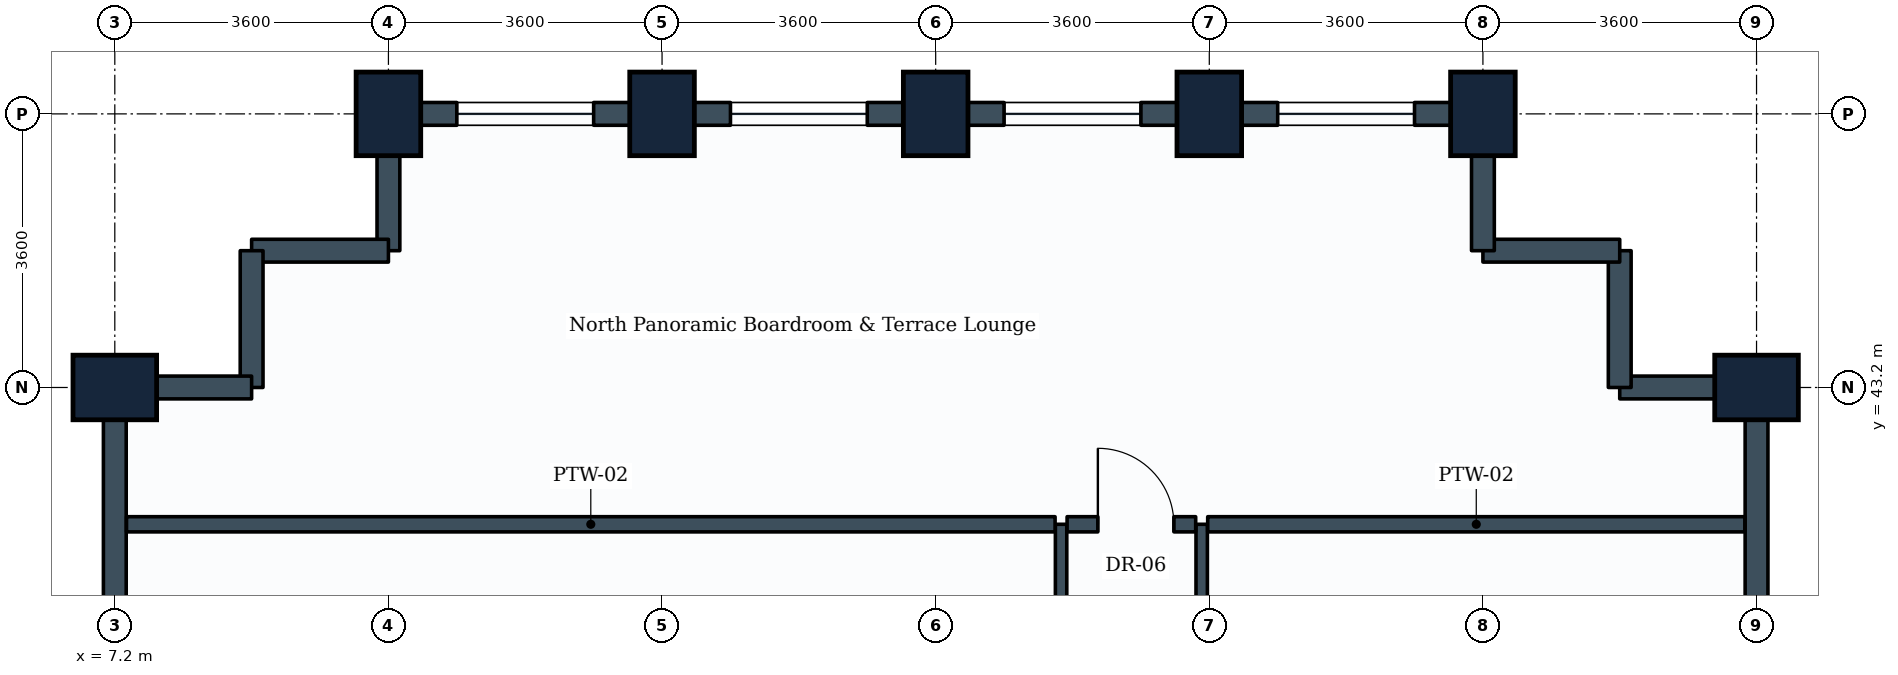
"""IFC4 building model, lengths in metres.
Left out: names, types, materials, properties, quantities, classifications, styles, units other than length and angle.
Written with IfcOpenShell. Run it as: python <this file> out.ifc"""

import sys

from ifc_helpers import new_model, si_unit, direction, frame, frame_2d, origin, origin_2d, place, context, subcontext, project, spatial, rectangle, extrude, element, fill, save


model = new_model("IFC4")
c1 = context("Model", 3, precision=1e-05, world=origin(), true_north=direction((0.0, 1.0)))
c2 = subcontext(c1, "Body", "Model", "MODEL_VIEW")
j1 = project(units=[si_unit("LENGTHUNIT", "METRE"), si_unit("PLANEANGLEUNIT", "RADIAN")], contexts=[c1])
p1 = place(None, origin())
s1 = spatial("IfcSite", under=j1, at=p1, CompositionType="ELEMENT")
p2 = place(p1, origin())
s2 = spatial("IfcBuilding", under=s1, at=p2, CompositionType="ELEMENT")
p3 = place(p2, frame((0.0, 0.0, 103.5)))
s3 = spatial("IfcBuildingStorey", under=s2, at=p3, CompositionType="ELEMENT", Elevation=103.5)
for number, where, z_axis, x_axis in (
    (1, (7.2, 43.2, 0.0), (0.0, 0.0, 1.0), (0.0, 1.0, 0.0)),
    (2, (10.8, 46.8, 0.0), (0.0, 0.0, 1.0), (1.0, 0.0, 0.0)),
    (3, (14.4, 46.8, 0.0), (0.0, 0.0, 1.0), (1.0, 0.0, 0.0)),
    (4, (18.0, 46.8, 0.0), (0.0, 0.0, 1.0), (1.0, 0.0, 0.0)),
    (5, (21.6, 46.8, 0.0), (0.0, 0.0, 1.0), (1.0, 0.0, 0.0)),
    (6, (25.2, 46.8, 0.0), (0.0, 0.0, 1.0), (1.0, 0.0, 0.0)),
    (7, (28.8, 43.2, 0.0), (0.0, 0.0, 1.0), (0.0, 1.0, 0.0)),
):
    element("IfcColumn", number, at=place(p3, frame(where, z_axis=z_axis, x_axis=x_axis)), inside=s3, PredefinedType="COLUMN", context=c2, shape_type="SweptSolid", body=[
        extrude(rectangle(XDim=0.85, YDim=1.1, at=origin_2d()), origin(), (0.0, 0.0, 1.0), 3.9),
    ])
p4 = place(p3, frame((28.8, 43.2, 0.0), z_axis=(0.0, 0.0, 1.0), x_axis=(0.0, -1.0, 0.0)))
e8 = element("IfcWall", 8, at=p4, inside=s3, PredefinedType="STANDARD", context=c2, shape_type="SweptSolid", body=[
    extrude(rectangle(XDim=3.6, YDim=0.3, at=frame_2d((1.8, 0.0))), origin(), (0.0, 0.0, 1.0), 2.93),
])
p5 = place(p3, frame((27.0, 43.2, 0.0), z_axis=(0.0, 0.0, 1.0), x_axis=(1.0, 0.0, 0.0)))
e9 = element("IfcWall", 9, at=p5, inside=s3, PredefinedType="STANDARD", context=c2, shape_type="SweptSolid", body=[
    extrude(rectangle(XDim=1.8, YDim=0.3, at=frame_2d((0.9, 0.0))), origin(), (0.0, 0.0, 1.0), 2.93),
])
for number, where, z_axis, x_axis in (
    (10, (27.0, 43.2, 0.0), (0.0, 0.0, 1.0), (0.0, 1.0, 0.0)),
    (11, (25.2, 45.0, 0.0), (0.0, 0.0, 1.0), (1.0, 0.0, 0.0)),
):
    element("IfcWall", number, at=place(p3, frame(where, z_axis=z_axis, x_axis=x_axis)), inside=s3, PredefinedType="STANDARD", context=c2, shape_type="SweptSolid", body=[
        extrude(rectangle(XDim=1.8, YDim=0.3, at=frame_2d((0.9, 0.0))), origin(), (0.0, 0.0, 1.0), 3.635),
    ])
p6 = place(p3, frame((25.2, 45.0, 0.0), z_axis=(0.0, 0.0, 1.0), x_axis=(0.0, 1.0, 0.0)))
e12 = element("IfcWall", 12, at=p6, inside=s3, PredefinedType="STANDARD", context=c2, shape_type="SweptSolid", body=[
    extrude(rectangle(XDim=1.8, YDim=0.3, at=frame_2d((0.9, 0.0))), origin(), (0.0, 0.0, 1.0), 2.93),
])
p7 = place(p3, frame((21.6, 46.8, 0.0), z_axis=(0.0, 0.0, 1.0), x_axis=(1.0, 0.0, 0.0)))
e13 = element("IfcWall", 13, at=p7, inside=s3, PredefinedType="STANDARD", context=c2, shape_type="SweptSolid", body=[
    extrude(rectangle(XDim=3.6, YDim=0.3, at=frame_2d((1.8, 0.0))), origin(), (0.0, 0.0, 1.0), 2.93),
])
p8 = place(p7, frame((0.9, 0.0, 0.85)))
e14 = element("IfcOpeningElement", 14, at=p8, cuts=e13, PredefinedType="OPENING", context=c2, shape_type="SweptSolid", body=[
    extrude(rectangle(XDim=1.8, YDim=1.35, at=frame_2d((0.9, 0.675))), frame((0.0, 0.16, 0.0), z_axis=(0.0, -1.0, 0.0), x_axis=(1.0, 0.0, 0.0)), (0.0, 0.0, 1.0), 0.32),
])
p9 = place(p3, frame((18.0, 46.8, 0.0), z_axis=(0.0, 0.0, 1.0), x_axis=(1.0, 0.0, 0.0)))
e15 = element("IfcWall", 15, at=p9, inside=s3, PredefinedType="STANDARD", context=c2, shape_type="SweptSolid", body=[
    extrude(rectangle(XDim=3.6, YDim=0.3, at=frame_2d((1.8, 0.0))), origin(), (0.0, 0.0, 1.0), 2.93),
])
p10 = place(p9, frame((0.9, 0.0, 0.85)))
e16 = element("IfcOpeningElement", 16, at=p10, cuts=e15, PredefinedType="OPENING", context=c2, shape_type="SweptSolid", body=[
    extrude(rectangle(XDim=1.8, YDim=1.35, at=frame_2d((0.9, 0.675))), frame((0.0, 0.16, 0.0), z_axis=(0.0, -1.0, 0.0), x_axis=(1.0, 0.0, 0.0)), (0.0, 0.0, 1.0), 0.32),
])
p11 = place(p3, frame((14.4, 46.8, 0.0), z_axis=(0.0, 0.0, 1.0), x_axis=(1.0, 0.0, 0.0)))
e17 = element("IfcWall", 17, at=p11, inside=s3, PredefinedType="STANDARD", context=c2, shape_type="SweptSolid", body=[
    extrude(rectangle(XDim=3.6, YDim=0.3, at=frame_2d((1.8, 0.0))), origin(), (0.0, 0.0, 1.0), 2.93),
])
p12 = place(p11, frame((0.9, 0.0, 0.85)))
e18 = element("IfcOpeningElement", 18, at=p12, cuts=e17, PredefinedType="OPENING", context=c2, shape_type="SweptSolid", body=[
    extrude(rectangle(XDim=1.8, YDim=1.35, at=frame_2d((0.9, 0.675))), frame((0.0, 0.16, 0.0), z_axis=(0.0, -1.0, 0.0), x_axis=(1.0, 0.0, 0.0)), (0.0, 0.0, 1.0), 0.32),
])
p13 = place(p3, frame((10.8, 46.8, 0.0), z_axis=(0.0, 0.0, 1.0), x_axis=(1.0, 0.0, 0.0)))
e19 = element("IfcWall", 19, at=p13, inside=s3, PredefinedType="STANDARD", context=c2, shape_type="SweptSolid", body=[
    extrude(rectangle(XDim=3.6, YDim=0.3, at=frame_2d((1.8, 0.0))), origin(), (0.0, 0.0, 1.0), 2.93),
])
p14 = place(p13, frame((0.9, 0.0, 0.85)))
e20 = element("IfcOpeningElement", 20, at=p14, cuts=e19, PredefinedType="OPENING", context=c2, shape_type="SweptSolid", body=[
    extrude(rectangle(XDim=1.8, YDim=1.35, at=frame_2d((0.9, 0.675))), frame((0.0, 0.16, 0.0), z_axis=(0.0, -1.0, 0.0), x_axis=(1.0, 0.0, 0.0)), (0.0, 0.0, 1.0), 0.32),
])
p15 = place(p3, frame((10.8, 45.0, 0.0), z_axis=(0.0, 0.0, 1.0), x_axis=(0.0, 1.0, 0.0)))
e21 = element("IfcWall", 21, at=p15, inside=s3, PredefinedType="STANDARD", context=c2, shape_type="SweptSolid", body=[
    extrude(rectangle(XDim=1.8, YDim=0.3, at=frame_2d((0.9, 0.0))), origin(), (0.0, 0.0, 1.0), 2.93),
])
for number, where, z_axis, x_axis in (
    (22, (9.0, 45.0, 0.0), (0.0, 0.0, 1.0), (1.0, 0.0, 0.0)),
    (23, (9.0, 43.2, 0.0), (0.0, 0.0, 1.0), (0.0, 1.0, 0.0)),
):
    element("IfcWall", number, at=place(p3, frame(where, z_axis=z_axis, x_axis=x_axis)), inside=s3, PredefinedType="STANDARD", context=c2, shape_type="SweptSolid", body=[
        extrude(rectangle(XDim=1.8, YDim=0.3, at=frame_2d((0.9, 0.0))), origin(), (0.0, 0.0, 1.0), 3.635),
    ])
p16 = place(p3, frame((7.2, 43.2, 0.0), z_axis=(0.0, 0.0, 1.0), x_axis=(1.0, 0.0, 0.0)))
e24 = element("IfcWall", 24, at=p16, inside=s3, PredefinedType="STANDARD", context=c2, shape_type="SweptSolid", body=[
    extrude(rectangle(XDim=1.8, YDim=0.3, at=frame_2d((0.9, 0.0))), origin(), (0.0, 0.0, 1.0), 2.93),
])
p17 = place(p3, frame((7.2, 39.6, 0.0), z_axis=(0.0, 0.0, 1.0), x_axis=(0.0, 1.0, 0.0)))
e25 = element("IfcWall", 25, at=p17, inside=s3, PredefinedType="STANDARD", context=c2, shape_type="SweptSolid", body=[
    extrude(rectangle(XDim=3.6, YDim=0.3, at=frame_2d((1.8, 0.0))), origin(), (0.0, 0.0, 1.0), 2.93),
])
p18 = place(p3, frame((19.65, 34.469, 0.0), z_axis=(0.0, 0.0, 1.0), x_axis=(0.0, 1.0, 0.0)))
e26 = element("IfcWall", 26, at=p18, inside=s3, PredefinedType="PARTITIONING", context=c2, shape_type="SweptSolid", body=[
    extrude(rectangle(XDim=6.931, YDim=0.15, at=frame_2d((3.465, 0.0))), origin(), (0.0, 0.0, 1.0), 3.19),
])
p19 = place(p18, frame((1.386, 0.0, 0.0)))
e27 = element("IfcOpeningElement", 27, at=p19, cuts=e26, PredefinedType="OPENING", context=c2, shape_type="SweptSolid", body=[
    extrude(rectangle(XDim=1.0, YDim=2.1, at=frame_2d((0.5, 1.05))), frame((0.0, 0.085, 0.0), z_axis=(0.0, -1.0, 0.0), x_axis=(1.0, 0.0, 0.0)), (0.0, 0.0, 1.0), 0.17),
])
p20 = place(p3, frame((21.5, 34.329, 0.0), z_axis=(0.0, 0.0, 1.0), x_axis=(0.0, 1.0, 0.0)))
e28 = element("IfcWall", 28, at=p20, inside=s3, PredefinedType="PARTITIONING", context=c2, shape_type="SweptSolid", body=[
    extrude(rectangle(XDim=7.071, YDim=0.15, at=frame_2d((3.535, 0.0))), origin(), (0.0, 0.0, 1.0), 3.18),
])
p21 = place(p20, frame((2.996, 0.0, 0.0)))
e29 = element("IfcOpeningElement", 29, at=p21, cuts=e28, PredefinedType="OPENING", context=c2, shape_type="SweptSolid", body=[
    extrude(rectangle(XDim=1.0, YDim=2.1, at=frame_2d((0.5, 1.05))), frame((0.0, 0.085, 0.0), z_axis=(0.0, -1.0, 0.0), x_axis=(1.0, 0.0, 0.0)), (0.0, 0.0, 1.0), 0.17),
])
p22 = place(p3, frame((7.354, 41.4, 0.0), z_axis=(0.0, 0.0, 1.0), x_axis=(1.0, 0.0, 0.0)))
e30 = element("IfcWall", 30, at=p22, inside=s3, PredefinedType="PARTITIONING", context=c2, shape_type="SweptSolid", body=[
    extrude(rectangle(XDim=12.217, YDim=0.2, at=frame_2d((6.108, 0.0))), origin(), (0.0, 0.0, 1.0), 2.93),
])
p23 = place(p3, frame((21.579, 41.4, 0.0), z_axis=(0.0, 0.0, 1.0), x_axis=(1.0, 0.0, 0.0)))
e31 = element("IfcWall", 31, at=p23, inside=s3, PredefinedType="PARTITIONING", context=c2, shape_type="SweptSolid", body=[
    extrude(rectangle(XDim=7.067, YDim=0.2, at=frame_2d((3.533, 0.0))), origin(), (0.0, 0.0, 1.0), 2.93),
])
p24 = place(p3, frame((19.729, 41.4, 0.0), z_axis=(0.0, 0.0, 1.0), x_axis=(1.0, 0.0, 0.0)))
e32 = element("IfcWall", 32, at=p24, inside=s3, PredefinedType="PARTITIONING", context=c2, shape_type="SweptSolid", body=[
    extrude(rectangle(XDim=1.692, YDim=0.2, at=frame_2d((0.846, 0.0))), origin(), (0.0, 0.0, 1.0), 3.635),
])
p25 = place(p24, frame((0.405, 0.0, 0.0)))
e33 = element("IfcOpeningElement", 33, at=p25, cuts=e32, PredefinedType="OPENING", context=c2, shape_type="SweptSolid", body=[
    extrude(rectangle(XDim=1.0, YDim=2.1, at=frame_2d((0.5, 1.05))), frame((0.0, 0.11, 0.0), z_axis=(0.0, -1.0, 0.0), x_axis=(1.0, 0.0, 0.0)), (0.0, 0.0, 1.0), 0.22),
])
p26 = place(p8, origin())
e34 = element("IfcWindow", 34, at=p26, inside=s3, PartitioningType="SINGLE_PANEL", PredefinedType="WINDOW", context=c2, shape_type="SweptSolid", body=[
    extrude(rectangle(XDim=1.8, YDim=1.35, at=frame_2d((0.9, 0.675))), frame((0.0, 0.03, 0.0), z_axis=(0.0, -1.0, 0.0), x_axis=(1.0, 0.0, 0.0)), (0.0, 0.0, 1.0), 0.06),
])
fill(e14, e34)
p27 = place(p10, origin())
e35 = element("IfcWindow", 35, at=p27, inside=s3, PartitioningType="SINGLE_PANEL", PredefinedType="WINDOW", context=c2, shape_type="SweptSolid", body=[
    extrude(rectangle(XDim=1.8, YDim=1.35, at=frame_2d((0.9, 0.675))), frame((0.0, 0.03, 0.0), z_axis=(0.0, -1.0, 0.0), x_axis=(1.0, 0.0, 0.0)), (0.0, 0.0, 1.0), 0.06),
])
fill(e16, e35)
p28 = place(p12, origin())
e36 = element("IfcWindow", 36, at=p28, inside=s3, PartitioningType="SINGLE_PANEL", PredefinedType="WINDOW", context=c2, shape_type="SweptSolid", body=[
    extrude(rectangle(XDim=1.8, YDim=1.35, at=frame_2d((0.9, 0.675))), frame((0.0, 0.03, 0.0), z_axis=(0.0, -1.0, 0.0), x_axis=(1.0, 0.0, 0.0)), (0.0, 0.0, 1.0), 0.06),
])
fill(e18, e36)
p29 = place(p14, origin())
e37 = element("IfcWindow", 37, at=p29, inside=s3, PartitioningType="SINGLE_PANEL", PredefinedType="WINDOW", context=c2, shape_type="SweptSolid", body=[
    extrude(rectangle(XDim=1.8, YDim=1.35, at=frame_2d((0.9, 0.675))), frame((0.0, 0.03, 0.0), z_axis=(0.0, -1.0, 0.0), x_axis=(1.0, 0.0, 0.0)), (0.0, 0.0, 1.0), 0.06),
])
fill(e20, e37)
p30 = place(p25, origin())
e38 = element("IfcDoor", 38, at=p30, inside=s3, OperationType="SINGLE_SWING_LEFT", PredefinedType="DOOR", context=c2, shape_type="SweptSolid", body=[
    extrude(rectangle(XDim=1.0, YDim=2.1, at=frame_2d((0.5, 1.05))), frame((0.0, 0.025, 0.0), z_axis=(0.0, -1.0, 0.0), x_axis=(1.0, 0.0, 0.0)), (0.0, 0.0, 1.0), 0.05),
])
fill(e33, e38)
save(model, sys.argv[1])
